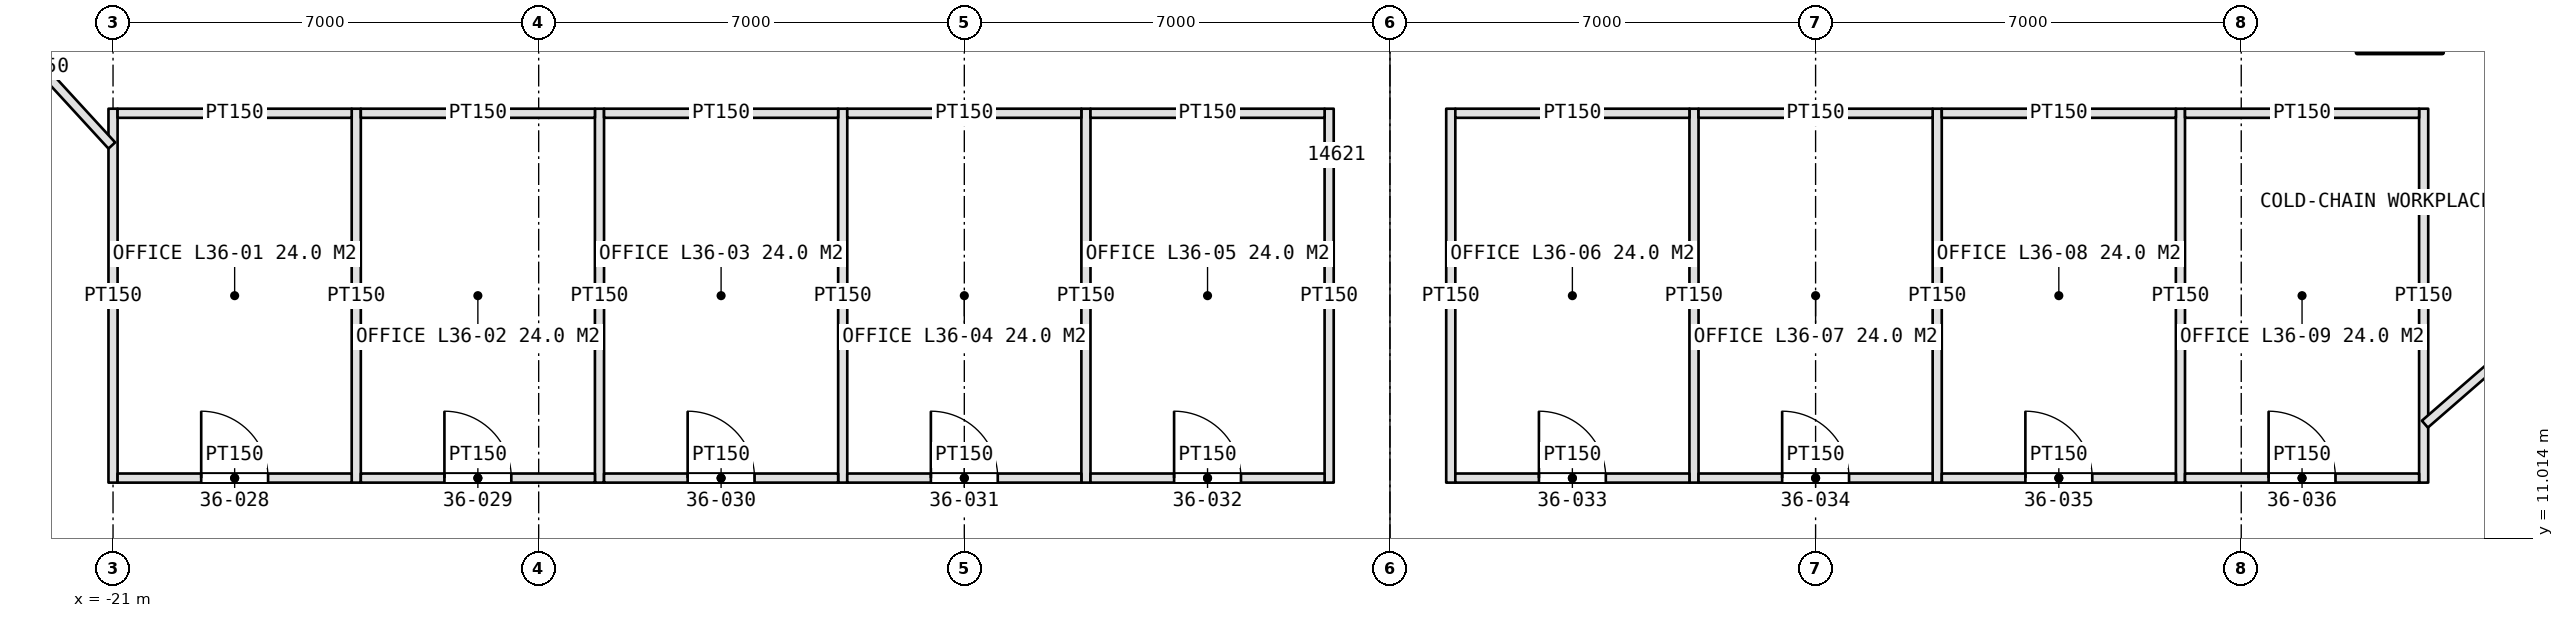
"""IFC4 building model, lengths in metres.
Left out: names, types, materials, properties, quantities, classifications, styles, units other than length and angle.
Written with IfcOpenShell. Run it as: python <this file> out.ifc"""

import sys

from ifc_helpers import new_model, si_unit, direction, frame, frame_2d, origin, origin_2d, place, context, subcontext, project, spatial, rectangle, extrude, element, fill, save


model = new_model("IFC4")
c1 = context("Model", 3, precision=1e-05, world=origin(), true_north=direction((0.0, 1.0)))
c2 = subcontext(c1, "Body", "Model", "MODEL_VIEW")
j1 = project(units=[si_unit("LENGTHUNIT", "METRE"), si_unit("PLANEANGLEUNIT", "RADIAN")], contexts=[c1])
p1 = place(None, origin())
s1 = spatial("IfcSite", under=j1, at=p1, CompositionType="ELEMENT")
p2 = place(p1, origin())
s2 = spatial("IfcBuilding", under=s1, at=p2, CompositionType="ELEMENT")
p3 = place(p2, frame((0.0, 0.0, 168.0)))
s3 = spatial("IfcBuildingStorey", under=s2, at=p3, CompositionType="ELEMENT", Elevation=168.0)
p4 = place(p3, frame((16.608, 19.695, 0.0), z_axis=(0.0, 0.0, 1.0), x_axis=(1.0, 0.0, 0.0)))
e1 = element("IfcColumn", 1, at=p4, inside=s3, PredefinedType="COLUMN", context=c2, shape_type="SweptSolid", body=[
    extrude(rectangle(XDim=1.4, YDim=1.4, at=origin_2d()), origin(), (0.0, 0.0, 1.0), 4.2),
])
for number, where, z_axis, x_axis in (
    (2, (-21.0, 11.925, 0.0), (0.0, 0.0, 1.0), (0.0, 1.0, 0.0)),
    (3, (-17.0, 11.925, 0.0), (0.0, 0.0, 1.0), (0.0, 1.0, 0.0)),
    (4, (-13.0, 11.925, 0.0), (0.0, 0.0, 1.0), (0.0, 1.0, 0.0)),
    (5, (-9.0, 11.925, 0.0), (0.0, 0.0, 1.0), (0.0, 1.0, 0.0)),
    (6, (-5.0, 11.925, 0.0), (0.0, 0.0, 1.0), (0.0, 1.0, 0.0)),
    (7, (-1.0, 11.925, 0.0), (0.0, 0.0, 1.0), (0.0, 1.0, 0.0)),
):
    element("IfcWall", number, at=place(p3, frame(where, z_axis=z_axis, x_axis=x_axis)), inside=s3, PredefinedType="PARTITIONING", context=c2, shape_type="SweptSolid", body=[
        extrude(rectangle(XDim=6.15, YDim=0.15, at=frame_2d((3.075, 0.0))), origin(), (0.0, 0.0, 1.0), 3.0),
    ])
p5 = place(p3, frame((-20.925, 12.0, 0.0), z_axis=(0.0, 0.0, 1.0), x_axis=(1.0, 0.0, 0.0)))
e8 = element("IfcWall", 8, at=p5, inside=s3, PredefinedType="PARTITIONING", context=c2, shape_type="SweptSolid", body=[
    extrude(rectangle(XDim=3.85, YDim=0.15, at=frame_2d((1.925, 0.0))), origin(), (0.0, 0.0, 1.0), 3.0),
])
p6 = place(p5, frame((1.375, 0.0, 0.0)))
e9 = element("IfcOpeningElement", 9, at=p6, cuts=e8, PredefinedType="OPENING", context=c2, shape_type="SweptSolid", body=[
    extrude(rectangle(XDim=1.1, YDim=2.3, at=frame_2d((0.55, 1.15))), frame((0.0, 0.085, 0.0), z_axis=(0.0, -1.0, 0.0), x_axis=(1.0, 0.0, 0.0)), (0.0, 0.0, 1.0), 0.17),
])
p7 = place(p3, frame((-20.925, 18.0, 0.0), z_axis=(0.0, 0.0, 1.0), x_axis=(1.0, 0.0, 0.0)))
e10 = element("IfcWall", 10, at=p7, inside=s3, PredefinedType="PARTITIONING", context=c2, shape_type="SweptSolid", body=[
    extrude(rectangle(XDim=3.85, YDim=0.15, at=frame_2d((1.925, 0.0))), origin(), (0.0, 0.0, 1.0), 3.0),
])
p8 = place(p3, frame((-16.925, 12.0, 0.0), z_axis=(0.0, 0.0, 1.0), x_axis=(1.0, 0.0, 0.0)))
e11 = element("IfcWall", 11, at=p8, inside=s3, PredefinedType="PARTITIONING", context=c2, shape_type="SweptSolid", body=[
    extrude(rectangle(XDim=3.85, YDim=0.15, at=frame_2d((1.925, 0.0))), origin(), (0.0, 0.0, 1.0), 3.0),
])
p9 = place(p8, frame((1.375, 0.0, 0.0)))
e12 = element("IfcOpeningElement", 12, at=p9, cuts=e11, PredefinedType="OPENING", context=c2, shape_type="SweptSolid", body=[
    extrude(rectangle(XDim=1.1, YDim=2.3, at=frame_2d((0.55, 1.15))), frame((0.0, 0.085, 0.0), z_axis=(0.0, -1.0, 0.0), x_axis=(1.0, 0.0, 0.0)), (0.0, 0.0, 1.0), 0.17),
])
p10 = place(p3, frame((-16.925, 18.0, 0.0), z_axis=(0.0, 0.0, 1.0), x_axis=(1.0, 0.0, 0.0)))
e13 = element("IfcWall", 13, at=p10, inside=s3, PredefinedType="PARTITIONING", context=c2, shape_type="SweptSolid", body=[
    extrude(rectangle(XDim=3.85, YDim=0.15, at=frame_2d((1.925, 0.0))), origin(), (0.0, 0.0, 1.0), 3.0),
])
p11 = place(p3, frame((-12.925, 12.0, 0.0), z_axis=(0.0, 0.0, 1.0), x_axis=(1.0, 0.0, 0.0)))
e14 = element("IfcWall", 14, at=p11, inside=s3, PredefinedType="PARTITIONING", context=c2, shape_type="SweptSolid", body=[
    extrude(rectangle(XDim=3.85, YDim=0.15, at=frame_2d((1.925, 0.0))), origin(), (0.0, 0.0, 1.0), 3.0),
])
p12 = place(p11, frame((1.375, 0.0, 0.0)))
e15 = element("IfcOpeningElement", 15, at=p12, cuts=e14, PredefinedType="OPENING", context=c2, shape_type="SweptSolid", body=[
    extrude(rectangle(XDim=1.1, YDim=2.3, at=frame_2d((0.55, 1.15))), frame((0.0, 0.085, 0.0), z_axis=(0.0, -1.0, 0.0), x_axis=(1.0, 0.0, 0.0)), (0.0, 0.0, 1.0), 0.17),
])
p13 = place(p3, frame((-12.925, 18.0, 0.0), z_axis=(0.0, 0.0, 1.0), x_axis=(1.0, 0.0, 0.0)))
e16 = element("IfcWall", 16, at=p13, inside=s3, PredefinedType="PARTITIONING", context=c2, shape_type="SweptSolid", body=[
    extrude(rectangle(XDim=3.85, YDim=0.15, at=frame_2d((1.925, 0.0))), origin(), (0.0, 0.0, 1.0), 3.0),
])
p14 = place(p3, frame((-8.925, 12.0, 0.0), z_axis=(0.0, 0.0, 1.0), x_axis=(1.0, 0.0, 0.0)))
e17 = element("IfcWall", 17, at=p14, inside=s3, PredefinedType="PARTITIONING", context=c2, shape_type="SweptSolid", body=[
    extrude(rectangle(XDim=3.85, YDim=0.15, at=frame_2d((1.925, 0.0))), origin(), (0.0, 0.0, 1.0), 3.0),
])
p15 = place(p14, frame((1.375, 0.0, 0.0)))
e18 = element("IfcOpeningElement", 18, at=p15, cuts=e17, PredefinedType="OPENING", context=c2, shape_type="SweptSolid", body=[
    extrude(rectangle(XDim=1.1, YDim=2.3, at=frame_2d((0.55, 1.15))), frame((0.0, 0.085, 0.0), z_axis=(0.0, -1.0, 0.0), x_axis=(1.0, 0.0, 0.0)), (0.0, 0.0, 1.0), 0.17),
])
p16 = place(p3, frame((-8.925, 18.0, 0.0), z_axis=(0.0, 0.0, 1.0), x_axis=(1.0, 0.0, 0.0)))
e19 = element("IfcWall", 19, at=p16, inside=s3, PredefinedType="PARTITIONING", context=c2, shape_type="SweptSolid", body=[
    extrude(rectangle(XDim=3.85, YDim=0.15, at=frame_2d((1.925, 0.0))), origin(), (0.0, 0.0, 1.0), 3.0),
])
p17 = place(p3, frame((-4.925, 12.0, 0.0), z_axis=(0.0, 0.0, 1.0), x_axis=(1.0, 0.0, 0.0)))
e20 = element("IfcWall", 20, at=p17, inside=s3, PredefinedType="PARTITIONING", context=c2, shape_type="SweptSolid", body=[
    extrude(rectangle(XDim=3.85, YDim=0.15, at=frame_2d((1.925, 0.0))), origin(), (0.0, 0.0, 1.0), 3.0),
])
p18 = place(p17, frame((1.375, 0.0, 0.0)))
e21 = element("IfcOpeningElement", 21, at=p18, cuts=e20, PredefinedType="OPENING", context=c2, shape_type="SweptSolid", body=[
    extrude(rectangle(XDim=1.1, YDim=2.3, at=frame_2d((0.55, 1.15))), frame((0.0, 0.085, 0.0), z_axis=(0.0, -1.0, 0.0), x_axis=(1.0, 0.0, 0.0)), (0.0, 0.0, 1.0), 0.17),
])
p19 = place(p3, frame((-4.925, 18.0, 0.0), z_axis=(0.0, 0.0, 1.0), x_axis=(1.0, 0.0, 0.0)))
e22 = element("IfcWall", 22, at=p19, inside=s3, PredefinedType="PARTITIONING", context=c2, shape_type="SweptSolid", body=[
    extrude(rectangle(XDim=3.85, YDim=0.15, at=frame_2d((1.925, 0.0))), origin(), (0.0, 0.0, 1.0), 3.0),
])
for number, where, z_axis, x_axis in (
    (23, (1.0, 11.925, 0.0), (0.0, 0.0, 1.0), (0.0, 1.0, 0.0)),
    (24, (5.0, 11.925, 0.0), (0.0, 0.0, 1.0), (0.0, 1.0, 0.0)),
    (25, (9.0, 11.925, 0.0), (0.0, 0.0, 1.0), (0.0, 1.0, 0.0)),
    (26, (13.0, 11.925, 0.0), (0.0, 0.0, 1.0), (0.0, 1.0, 0.0)),
    (27, (17.0, 11.925, 0.0), (0.0, 0.0, 1.0), (0.0, 1.0, 0.0)),
):
    element("IfcWall", number, at=place(p3, frame(where, z_axis=z_axis, x_axis=x_axis)), inside=s3, PredefinedType="PARTITIONING", context=c2, shape_type="SweptSolid", body=[
        extrude(rectangle(XDim=6.15, YDim=0.15, at=frame_2d((3.075, 0.0))), origin(), (0.0, 0.0, 1.0), 3.0),
    ])
p20 = place(p3, frame((1.075, 12.0, 0.0), z_axis=(0.0, 0.0, 1.0), x_axis=(1.0, 0.0, 0.0)))
e28 = element("IfcWall", 28, at=p20, inside=s3, PredefinedType="PARTITIONING", context=c2, shape_type="SweptSolid", body=[
    extrude(rectangle(XDim=3.85, YDim=0.15, at=frame_2d((1.925, 0.0))), origin(), (0.0, 0.0, 1.0), 3.0),
])
p21 = place(p20, frame((1.375, 0.0, 0.0)))
e29 = element("IfcOpeningElement", 29, at=p21, cuts=e28, PredefinedType="OPENING", context=c2, shape_type="SweptSolid", body=[
    extrude(rectangle(XDim=1.1, YDim=2.3, at=frame_2d((0.55, 1.15))), frame((0.0, 0.085, 0.0), z_axis=(0.0, -1.0, 0.0), x_axis=(1.0, 0.0, 0.0)), (0.0, 0.0, 1.0), 0.17),
])
p22 = place(p3, frame((1.075, 18.0, 0.0), z_axis=(0.0, 0.0, 1.0), x_axis=(1.0, 0.0, 0.0)))
e30 = element("IfcWall", 30, at=p22, inside=s3, PredefinedType="PARTITIONING", context=c2, shape_type="SweptSolid", body=[
    extrude(rectangle(XDim=3.85, YDim=0.15, at=frame_2d((1.925, 0.0))), origin(), (0.0, 0.0, 1.0), 3.0),
])
p23 = place(p3, frame((5.075, 12.0, 0.0), z_axis=(0.0, 0.0, 1.0), x_axis=(1.0, 0.0, 0.0)))
e31 = element("IfcWall", 31, at=p23, inside=s3, PredefinedType="PARTITIONING", context=c2, shape_type="SweptSolid", body=[
    extrude(rectangle(XDim=3.85, YDim=0.15, at=frame_2d((1.925, 0.0))), origin(), (0.0, 0.0, 1.0), 3.0),
])
p24 = place(p23, frame((1.375, 0.0, 0.0)))
e32 = element("IfcOpeningElement", 32, at=p24, cuts=e31, PredefinedType="OPENING", context=c2, shape_type="SweptSolid", body=[
    extrude(rectangle(XDim=1.1, YDim=2.3, at=frame_2d((0.55, 1.15))), frame((0.0, 0.085, 0.0), z_axis=(0.0, -1.0, 0.0), x_axis=(1.0, 0.0, 0.0)), (0.0, 0.0, 1.0), 0.17),
])
p25 = place(p3, frame((5.075, 18.0, 0.0), z_axis=(0.0, 0.0, 1.0), x_axis=(1.0, 0.0, 0.0)))
e33 = element("IfcWall", 33, at=p25, inside=s3, PredefinedType="PARTITIONING", context=c2, shape_type="SweptSolid", body=[
    extrude(rectangle(XDim=3.85, YDim=0.15, at=frame_2d((1.925, 0.0))), origin(), (0.0, 0.0, 1.0), 3.0),
])
p26 = place(p3, frame((9.075, 12.0, 0.0), z_axis=(0.0, 0.0, 1.0), x_axis=(1.0, 0.0, 0.0)))
e34 = element("IfcWall", 34, at=p26, inside=s3, PredefinedType="PARTITIONING", context=c2, shape_type="SweptSolid", body=[
    extrude(rectangle(XDim=3.85, YDim=0.15, at=frame_2d((1.925, 0.0))), origin(), (0.0, 0.0, 1.0), 3.0),
])
p27 = place(p26, frame((1.375, 0.0, 0.0)))
e35 = element("IfcOpeningElement", 35, at=p27, cuts=e34, PredefinedType="OPENING", context=c2, shape_type="SweptSolid", body=[
    extrude(rectangle(XDim=1.1, YDim=2.3, at=frame_2d((0.55, 1.15))), frame((0.0, 0.085, 0.0), z_axis=(0.0, -1.0, 0.0), x_axis=(1.0, 0.0, 0.0)), (0.0, 0.0, 1.0), 0.17),
])
p28 = place(p3, frame((9.075, 18.0, 0.0), z_axis=(0.0, 0.0, 1.0), x_axis=(1.0, 0.0, 0.0)))
e36 = element("IfcWall", 36, at=p28, inside=s3, PredefinedType="PARTITIONING", context=c2, shape_type="SweptSolid", body=[
    extrude(rectangle(XDim=3.85, YDim=0.15, at=frame_2d((1.925, 0.0))), origin(), (0.0, 0.0, 1.0), 3.0),
])
p29 = place(p3, frame((13.075, 12.0, 0.0), z_axis=(0.0, 0.0, 1.0), x_axis=(1.0, 0.0, 0.0)))
e37 = element("IfcWall", 37, at=p29, inside=s3, PredefinedType="PARTITIONING", context=c2, shape_type="SweptSolid", body=[
    extrude(rectangle(XDim=3.85, YDim=0.15, at=frame_2d((1.925, 0.0))), origin(), (0.0, 0.0, 1.0), 3.0),
])
p30 = place(p29, frame((1.375, 0.0, 0.0)))
e38 = element("IfcOpeningElement", 38, at=p30, cuts=e37, PredefinedType="OPENING", context=c2, shape_type="SweptSolid", body=[
    extrude(rectangle(XDim=1.1, YDim=2.3, at=frame_2d((0.55, 1.15))), frame((0.0, 0.085, 0.0), z_axis=(0.0, -1.0, 0.0), x_axis=(1.0, 0.0, 0.0)), (0.0, 0.0, 1.0), 0.17),
])
p31 = place(p3, frame((13.075, 18.0, 0.0), z_axis=(0.0, 0.0, 1.0), x_axis=(1.0, 0.0, 0.0)))
e39 = element("IfcWall", 39, at=p31, inside=s3, PredefinedType="PARTITIONING", context=c2, shape_type="SweptSolid", body=[
    extrude(rectangle(XDim=3.85, YDim=0.15, at=frame_2d((1.925, 0.0))), origin(), (0.0, 0.0, 1.0), 3.0),
])
p32 = place(p3, frame((-21.02, 17.47, 0.0), z_axis=(0.0, 0.0, 1.0), x_axis=(-0.67615762792, 0.736756989927, 0.0)))
e40 = element("IfcWall", 40, at=p32, inside=s3, PredefinedType="PARTITIONING", context=c2, shape_type="SweptSolid", body=[
    extrude(rectangle(XDim=3.497, YDim=0.15, at=frame_2d((1.749, 0.0))), origin(), (0.0, 0.0, 1.0), 3.0),
])
p33 = place(p3, frame((17.02, 12.887, 0.0), z_axis=(0.0, 0.0, 1.0), x_axis=(0.75468613342, 0.656086000479, 0.0)))
e41 = element("IfcWall", 41, at=p33, inside=s3, PredefinedType="PARTITIONING", context=c2, shape_type="SweptSolid", body=[
    extrude(rectangle(XDim=8.867, YDim=0.15, at=frame_2d((4.433, 0.0))), origin(), (0.0, 0.0, 1.0), 3.0),
])
p34 = place(p6, origin())
e42 = element("IfcDoor", 42, at=p34, inside=s3, OperationType="SINGLE_SWING_LEFT", PredefinedType="DOOR", context=c2, shape_type="SweptSolid", body=[
    extrude(rectangle(XDim=1.1, YDim=2.3, at=frame_2d((0.55, 1.15))), frame((0.0, 0.025, 0.0), z_axis=(0.0, -1.0, 0.0), x_axis=(1.0, 0.0, 0.0)), (0.0, 0.0, 1.0), 0.05),
])
fill(e9, e42)
p35 = place(p9, origin())
e43 = element("IfcDoor", 43, at=p35, inside=s3, OperationType="SINGLE_SWING_LEFT", PredefinedType="DOOR", context=c2, shape_type="SweptSolid", body=[
    extrude(rectangle(XDim=1.1, YDim=2.3, at=frame_2d((0.55, 1.15))), frame((0.0, 0.025, 0.0), z_axis=(0.0, -1.0, 0.0), x_axis=(1.0, 0.0, 0.0)), (0.0, 0.0, 1.0), 0.05),
])
fill(e12, e43)
p36 = place(p12, origin())
e44 = element("IfcDoor", 44, at=p36, inside=s3, OperationType="SINGLE_SWING_LEFT", PredefinedType="DOOR", context=c2, shape_type="SweptSolid", body=[
    extrude(rectangle(XDim=1.1, YDim=2.3, at=frame_2d((0.55, 1.15))), frame((0.0, 0.025, 0.0), z_axis=(0.0, -1.0, 0.0), x_axis=(1.0, 0.0, 0.0)), (0.0, 0.0, 1.0), 0.05),
])
fill(e15, e44)
p37 = place(p15, origin())
e45 = element("IfcDoor", 45, at=p37, inside=s3, OperationType="SINGLE_SWING_LEFT", PredefinedType="DOOR", context=c2, shape_type="SweptSolid", body=[
    extrude(rectangle(XDim=1.1, YDim=2.3, at=frame_2d((0.55, 1.15))), frame((0.0, 0.025, 0.0), z_axis=(0.0, -1.0, 0.0), x_axis=(1.0, 0.0, 0.0)), (0.0, 0.0, 1.0), 0.05),
])
fill(e18, e45)
p38 = place(p18, origin())
e46 = element("IfcDoor", 46, at=p38, inside=s3, OperationType="SINGLE_SWING_LEFT", PredefinedType="DOOR", context=c2, shape_type="SweptSolid", body=[
    extrude(rectangle(XDim=1.1, YDim=2.3, at=frame_2d((0.55, 1.15))), frame((0.0, 0.025, 0.0), z_axis=(0.0, -1.0, 0.0), x_axis=(1.0, 0.0, 0.0)), (0.0, 0.0, 1.0), 0.05),
])
fill(e21, e46)
p39 = place(p21, origin())
e47 = element("IfcDoor", 47, at=p39, inside=s3, OperationType="SINGLE_SWING_LEFT", PredefinedType="DOOR", context=c2, shape_type="SweptSolid", body=[
    extrude(rectangle(XDim=1.1, YDim=2.3, at=frame_2d((0.55, 1.15))), frame((0.0, 0.025, 0.0), z_axis=(0.0, -1.0, 0.0), x_axis=(1.0, 0.0, 0.0)), (0.0, 0.0, 1.0), 0.05),
])
fill(e29, e47)
p40 = place(p24, origin())
e48 = element("IfcDoor", 48, at=p40, inside=s3, OperationType="SINGLE_SWING_LEFT", PredefinedType="DOOR", context=c2, shape_type="SweptSolid", body=[
    extrude(rectangle(XDim=1.1, YDim=2.3, at=frame_2d((0.55, 1.15))), frame((0.0, 0.025, 0.0), z_axis=(0.0, -1.0, 0.0), x_axis=(1.0, 0.0, 0.0)), (0.0, 0.0, 1.0), 0.05),
])
fill(e32, e48)
p41 = place(p27, origin())
e49 = element("IfcDoor", 49, at=p41, inside=s3, OperationType="SINGLE_SWING_LEFT", PredefinedType="DOOR", context=c2, shape_type="SweptSolid", body=[
    extrude(rectangle(XDim=1.1, YDim=2.3, at=frame_2d((0.55, 1.15))), frame((0.0, 0.025, 0.0), z_axis=(0.0, -1.0, 0.0), x_axis=(1.0, 0.0, 0.0)), (0.0, 0.0, 1.0), 0.05),
])
fill(e35, e49)
p42 = place(p30, origin())
e50 = element("IfcDoor", 50, at=p42, inside=s3, OperationType="SINGLE_SWING_LEFT", PredefinedType="DOOR", context=c2, shape_type="SweptSolid", body=[
    extrude(rectangle(XDim=1.1, YDim=2.3, at=frame_2d((0.55, 1.15))), frame((0.0, 0.025, 0.0), z_axis=(0.0, -1.0, 0.0), x_axis=(1.0, 0.0, 0.0)), (0.0, 0.0, 1.0), 0.05),
])
fill(e38, e50)
save(model, sys.argv[1])
